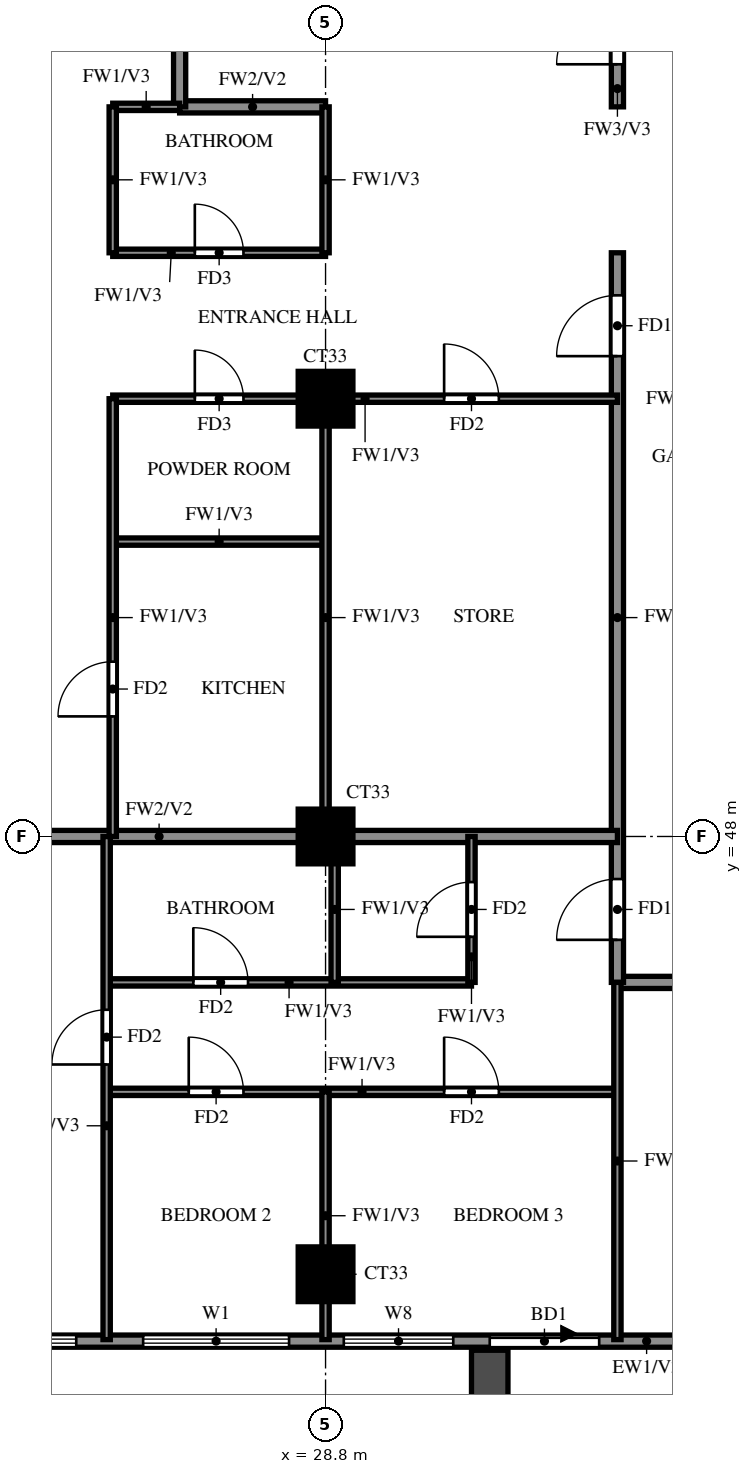
"""IFC4 building model, lengths in metres.
Left out: names, types, materials, properties, quantities, classifications, styles, units other than length and angle.
Written with IfcOpenShell. Run it as: python <this file> out.ifc"""

import sys

from ifc_helpers import new_model, si_unit, direction, frame, frame_2d, origin, origin_2d, place, context, subcontext, project, spatial, rectangle, extrude, source, transform, mapped, element, fill, save


model = new_model("IFC4")
c1 = context("Model", 3, precision=1e-05, world=origin(), true_north=direction((0.0, 1.0)))
c2 = subcontext(c1, "Body", "Model", "MODEL_VIEW")
j1 = project(units=[si_unit("LENGTHUNIT", "METRE"), si_unit("PLANEANGLEUNIT", "RADIAN")], contexts=[c1])
p1 = place(None, origin())
s1 = spatial("IfcSite", under=j1, at=p1, CompositionType="ELEMENT")
p2 = place(p1, origin())
s2 = spatial("IfcBuilding", under=s1, at=p2, CompositionType="ELEMENT")
p3 = place(p2, frame((0.0, 0.0, 225.5)))
s3 = spatial("IfcBuildingStorey", under=s2, at=p3, CompositionType="ELEMENT", Elevation=225.5)
m1 = source(origin(), c2, "Body", "SweptSolid", [
    extrude(rectangle(XDim=0.9, YDim=0.9, at=origin_2d()), origin(), (0.0, 0.0, 1.0), 3.22),
])
for number, where, z_axis, x_axis in (
    (1, (28.8, 40.8, 0.0), (0.0, 0.0, 1.0), (1.0, 0.0, 0.0)),
    (2, (28.8, 48.0, 0.0), (0.0, 0.0, 1.0), (1.0, 0.0, 0.0)),
    (3, (28.8, 55.2, 0.0), (0.0, 0.0, 1.0), (1.0, 0.0, 0.0)),
):
    element("IfcColumn", number, at=place(p3, frame(where, z_axis=z_axis, x_axis=x_axis)), inside=s3, PredefinedType="COLUMN", context=c2, shape_type="MappedRepresentation", body=[
        mapped(m1, transform((0.0, 0.0, 0.0))),
    ])
p4 = place(p3, frame((22.2, 39.7, 0.0), z_axis=(0.0, 0.0, 1.0), x_axis=(1.0, 0.0, 0.0)))
e4 = element("IfcWall", 4, at=p4, inside=s3, PredefinedType="SOLIDWALL", context=c2, shape_type="SweptSolid", body=[
    extrude(rectangle(XDim=19.8, YDim=0.2, at=frame_2d((9.9, 0.0))), origin(), (0.0, 0.0, 1.0), 3.22),
])
p5 = place(p4, frame((9.3, 0.0, 0.0)))
e5 = element("IfcOpeningElement", 5, at=p5, cuts=e4, PredefinedType="OPENING", context=c2, shape_type="SweptSolid", body=[
    extrude(rectangle(XDim=1.8, YDim=2.4, at=frame_2d((0.9, 1.2))), frame((0.0, 0.11, 0.0), z_axis=(0.0, -1.0, 0.0), x_axis=(1.0, 0.0, 0.0)), (0.0, 0.0, 1.0), 0.22),
])
p6 = place(p4, frame((0.7, 0.0, 0.6)))
e6 = element("IfcOpeningElement", 6, at=p6, cuts=e4, PredefinedType="OPENING", context=c2, shape_type="SweptSolid", body=[
    extrude(rectangle(XDim=1.8, YDim=2.4, at=frame_2d((0.9, 1.2))), frame((0.0, 0.11, 0.0), z_axis=(0.0, -1.0, 0.0), x_axis=(1.0, 0.0, 0.0)), (0.0, 0.0, 1.0), 0.22),
])
p7 = place(p4, frame((3.6, 0.0, 0.6)))
e7 = element("IfcOpeningElement", 7, at=p7, cuts=e4, PredefinedType="OPENING", context=c2, shape_type="SweptSolid", body=[
    extrude(rectangle(XDim=2.4, YDim=2.4, at=frame_2d((1.2, 1.2))), frame((0.0, 0.11, 0.0), z_axis=(0.0, -1.0, 0.0), x_axis=(1.0, 0.0, 0.0)), (0.0, 0.0, 1.0), 0.22),
])
p8 = place(p4, frame((6.9, 0.0, 0.6)))
e8 = element("IfcOpeningElement", 8, at=p8, cuts=e4, PredefinedType="OPENING", context=c2, shape_type="SweptSolid", body=[
    extrude(rectangle(XDim=1.8, YDim=2.4, at=frame_2d((0.9, 1.2))), frame((0.0, 0.11, 0.0), z_axis=(0.0, -1.0, 0.0), x_axis=(1.0, 0.0, 0.0)), (0.0, 0.0, 1.0), 0.22),
])
p9 = place(p3, frame((31.5, 39.55, 0.0), z_axis=(0.0, 0.0, 1.0), x_axis=(0.0, -1.0, 0.0)))
e9 = element("IfcWall", 9, at=p9, inside=s3, PredefinedType="SOLIDWALL", context=c2, shape_type="SweptSolid", body=[
    extrude(rectangle(XDim=2.65, YDim=0.6, at=frame_2d((1.325, 0.0))), origin(), (0.0, 0.0, 1.0), 2.85),
])
p10 = place(p3, frame((33.6, 45.6, 0.0), z_axis=(0.0, 0.0, 1.0), x_axis=(1.0, 0.0, 0.0)))
e10 = element("IfcWall", 10, at=p10, inside=s3, PredefinedType="SOLIDWALL", context=c2, shape_type="SweptSolid", body=[
    extrude(rectangle(XDim=7.2, YDim=0.2, at=frame_2d((3.6, 0.0))), origin(), (0.0, 0.0, 1.0), 3.22),
])
p11 = place(p10, frame((3.15, 0.0, 0.0)))
e11 = element("IfcOpeningElement", 11, at=p11, cuts=e10, PredefinedType="OPENING", context=c2, shape_type="SweptSolid", body=[
    extrude(rectangle(XDim=0.9, YDim=2.1, at=frame_2d((0.45, 1.05))), frame((0.0, 0.11, 0.0), z_axis=(0.0, -1.0, 0.0), x_axis=(1.0, 0.0, 0.0)), (0.0, 0.0, 1.0), 0.22),
])
p12 = place(p3, frame((33.6, 45.6, 0.0), z_axis=(0.0, 0.0, 1.0), x_axis=(0.0, 1.0, 0.0)))
e12 = element("IfcWall", 12, at=p12, inside=s3, PredefinedType="SOLIDWALL", context=c2, shape_type="SweptSolid", body=[
    extrude(rectangle(XDim=12.0, YDim=0.2, at=frame_2d((6.0, 0.0))), origin(), (0.0, 0.0, 1.0), 3.22),
])
p13 = place(p12, frame((0.7, 0.0, 0.0)))
e13 = element("IfcOpeningElement", 13, at=p13, cuts=e12, PredefinedType="OPENING", context=c2, shape_type="SweptSolid", body=[
    extrude(rectangle(XDim=1.0, YDim=2.1, at=frame_2d((0.5, 1.05))), frame((0.0, 0.11, 0.0), z_axis=(0.0, -1.0, 0.0), x_axis=(1.0, 0.0, 0.0)), (0.0, 0.0, 1.0), 0.22),
])
p14 = place(p12, frame((10.3, 0.0, 0.0)))
e14 = element("IfcOpeningElement", 14, at=p14, cuts=e12, PredefinedType="OPENING", context=c2, shape_type="SweptSolid", body=[
    extrude(rectangle(XDim=1.0, YDim=2.1, at=frame_2d((0.5, 1.05))), frame((0.0, 0.11, 0.0), z_axis=(0.0, -1.0, 0.0), x_axis=(1.0, 0.0, 0.0)), (0.0, 0.0, 1.0), 0.22),
])
p15 = place(p3, frame((33.6, 60.0, 0.0), z_axis=(0.0, 0.0, 1.0), x_axis=(0.0, 1.0, 0.0)))
e15 = element("IfcWall", 15, at=p15, inside=s3, PredefinedType="SOLIDWALL", context=c2, shape_type="SweptSolid", body=[
    extrude(rectangle(XDim=2.4, YDim=0.2, at=frame_2d((1.2, 0.0))), origin(), (0.0, 0.0, 1.0), 3.22),
])
p16 = place(p15, frame((0.7, 0.0, 0.0)))
e16 = element("IfcOpeningElement", 16, at=p16, cuts=e15, PredefinedType="OPENING", context=c2, shape_type="SweptSolid", body=[
    extrude(rectangle(XDim=1.0, YDim=2.1, at=frame_2d((0.5, 1.05))), frame((0.0, 0.11, 0.0), z_axis=(0.0, -1.0, 0.0), x_axis=(1.0, 0.0, 0.0)), (0.0, 0.0, 1.0), 0.22),
])
p17 = place(p3, frame((18.525, 48.0, 0.0), z_axis=(0.0, 0.0, 1.0), x_axis=(1.0, 0.0, 0.0)))
e17 = element("IfcWall", 17, at=p17, inside=s3, PredefinedType="SOLIDWALL", context=c2, shape_type="SweptSolid", body=[
    extrude(rectangle(XDim=15.075, YDim=0.2, at=frame_2d((7.538, 0.0))), origin(), (0.0, 0.0, 1.0), 3.22),
])
p18 = place(p3, frame((26.4, 60.0, 0.0), z_axis=(0.0, 0.0, 1.0), x_axis=(1.0, 0.0, 0.0)))
e18 = element("IfcWall", 18, at=p18, inside=s3, PredefinedType="SOLIDWALL", context=c2, shape_type="SweptSolid", body=[
    extrude(rectangle(XDim=2.4, YDim=0.2, at=frame_2d((1.2, 0.0))), origin(), (0.0, 0.0, 1.0), 3.22),
])
p19 = place(p3, frame((26.4, 60.0, 0.0), z_axis=(0.0, 0.0, 1.0), x_axis=(0.0, 1.0, 0.0)))
e19 = element("IfcWall", 19, at=p19, inside=s3, PredefinedType="SOLIDWALL", context=c2, shape_type="SweptSolid", body=[
    extrude(rectangle(XDim=2.4, YDim=0.2, at=frame_2d((1.2, 0.0))), origin(), (0.0, 0.0, 1.0), 3.22),
])
p20 = place(p3, frame((25.2, 43.8, 0.0), z_axis=(0.0, 0.0, 1.0), x_axis=(1.0, 0.0, 0.0)))
e20 = element("IfcWall", 20, at=p20, inside=s3, PredefinedType="PARTITIONING", context=c2, shape_type="SweptSolid", body=[
    extrude(rectangle(XDim=8.4, YDim=0.12, at=frame_2d((4.2, 0.0))), origin(), (0.0, 0.0, 1.0), 3.22),
])
p21 = place(p20, frame((1.35, 0.0, 0.0)))
e21 = element("IfcOpeningElement", 21, at=p21, cuts=e20, PredefinedType="OPENING", context=c2, shape_type="SweptSolid", body=[
    extrude(rectangle(XDim=0.9, YDim=2.1, at=frame_2d((0.45, 1.05))), frame((0.0, 0.07, 0.0), z_axis=(0.0, -1.0, 0.0), x_axis=(1.0, 0.0, 0.0)), (0.0, 0.0, 1.0), 0.14),
])
p22 = place(p20, frame((5.55, 0.0, 0.0)))
e22 = element("IfcOpeningElement", 22, at=p22, cuts=e20, PredefinedType="OPENING", context=c2, shape_type="SweptSolid", body=[
    extrude(rectangle(XDim=0.9, YDim=2.1, at=frame_2d((0.45, 1.05))), frame((0.0, 0.07, 0.0), z_axis=(0.0, -1.0, 0.0), x_axis=(1.0, 0.0, 0.0)), (0.0, 0.0, 1.0), 0.14),
])
p23 = place(p3, frame((25.2, 45.6, 0.0), z_axis=(0.0, 0.0, 1.0), x_axis=(1.0, 0.0, 0.0)))
e23 = element("IfcWall", 23, at=p23, inside=s3, PredefinedType="PARTITIONING", context=c2, shape_type="SweptSolid", body=[
    extrude(rectangle(XDim=6.0, YDim=0.12, at=frame_2d((3.0, 0.0))), origin(), (0.0, 0.0, 1.0), 3.22),
])
p24 = place(p23, frame((1.425, 0.0, 0.0)))
e24 = element("IfcOpeningElement", 24, at=p24, cuts=e23, PredefinedType="OPENING", context=c2, shape_type="SweptSolid", body=[
    extrude(rectangle(XDim=0.9, YDim=2.1, at=frame_2d((0.45, 1.05))), frame((0.0, 0.07, 0.0), z_axis=(0.0, -1.0, 0.0), x_axis=(1.0, 0.0, 0.0)), (0.0, 0.0, 1.0), 0.14),
])
p25 = place(p3, frame((25.3, 52.85, 0.0), z_axis=(0.0, 0.0, 1.0), x_axis=(1.0, 0.0, 0.0)))
e25 = element("IfcWall", 25, at=p25, inside=s3, PredefinedType="PARTITIONING", context=c2, shape_type="SweptSolid", body=[
    extrude(rectangle(XDim=3.5, YDim=0.12, at=frame_2d((1.75, 0.0))), origin(), (0.0, 0.0, 1.0), 3.22),
])
p26 = place(p3, frame((25.3, 55.2, 0.0), z_axis=(0.0, 0.0, 1.0), x_axis=(1.0, 0.0, 0.0)))
e26 = element("IfcWall", 26, at=p26, inside=s3, PredefinedType="PARTITIONING", context=c2, shape_type="SweptSolid", body=[
    extrude(rectangle(XDim=8.3, YDim=0.12, at=frame_2d((4.15, 0.0))), origin(), (0.0, 0.0, 1.0), 3.22),
])
p27 = place(p26, frame((1.35, 0.0, 0.0)))
e27 = element("IfcOpeningElement", 27, at=p27, cuts=e26, PredefinedType="OPENING", context=c2, shape_type="SweptSolid", body=[
    extrude(rectangle(XDim=0.8, YDim=2.1, at=frame_2d((0.4, 1.05))), frame((0.0, 0.07, 0.0), z_axis=(0.0, -1.0, 0.0), x_axis=(1.0, 0.0, 0.0)), (0.0, 0.0, 1.0), 0.14),
])
p28 = place(p26, frame((5.45, 0.0, 0.0)))
e28 = element("IfcOpeningElement", 28, at=p28, cuts=e26, PredefinedType="OPENING", context=c2, shape_type="SweptSolid", body=[
    extrude(rectangle(XDim=0.9, YDim=2.1, at=frame_2d((0.45, 1.05))), frame((0.0, 0.07, 0.0), z_axis=(0.0, -1.0, 0.0), x_axis=(1.0, 0.0, 0.0)), (0.0, 0.0, 1.0), 0.14),
])
p29 = place(p3, frame((25.3, 57.6, 0.0), z_axis=(0.0, 0.0, 1.0), x_axis=(1.0, 0.0, 0.0)))
e29 = element("IfcWall", 29, at=p29, inside=s3, PredefinedType="PARTITIONING", context=c2, shape_type="SweptSolid", body=[
    extrude(rectangle(XDim=3.5, YDim=0.12, at=frame_2d((1.75, 0.0))), origin(), (0.0, 0.0, 1.0), 3.22),
])
p30 = place(p29, frame((1.35, 0.0, 0.0)))
e30 = element("IfcOpeningElement", 30, at=p30, cuts=e29, PredefinedType="OPENING", context=c2, shape_type="SweptSolid", body=[
    extrude(rectangle(XDim=0.8, YDim=2.1, at=frame_2d((0.4, 1.05))), frame((0.0, 0.07, 0.0), z_axis=(0.0, -1.0, 0.0), x_axis=(1.0, 0.0, 0.0)), (0.0, 0.0, 1.0), 0.14),
])
p31 = place(p3, frame((25.3, 60.0, 0.0), z_axis=(0.0, 0.0, 1.0), x_axis=(1.0, 0.0, 0.0)))
e31 = element("IfcWall", 31, at=p31, inside=s3, PredefinedType="PARTITIONING", context=c2, shape_type="SweptSolid", body=[
    extrude(rectangle(XDim=1.1, YDim=0.12, at=frame_2d((0.55, 0.0))), origin(), (0.0, 0.0, 1.0), 3.22),
])
p32 = place(p3, frame((25.2, 39.725, 0.0), z_axis=(0.0, 0.0, 1.0), x_axis=(0.0, 1.0, 0.0)))
e32 = element("IfcWall", 32, at=p32, inside=s3, PredefinedType="PARTITIONING", context=c2, shape_type="SweptSolid", body=[
    extrude(rectangle(XDim=8.275, YDim=0.12, at=frame_2d((4.137, 0.0))), origin(), (0.0, 0.0, 1.0), 3.22),
])
p33 = place(p32, frame((4.525, 0.0, 0.0)))
e33 = element("IfcOpeningElement", 33, at=p33, cuts=e32, PredefinedType="OPENING", context=c2, shape_type="SweptSolid", body=[
    extrude(rectangle(XDim=0.9, YDim=2.1, at=frame_2d((0.45, 1.05))), frame((0.0, 0.07, 0.0), z_axis=(0.0, -1.0, 0.0), x_axis=(1.0, 0.0, 0.0)), (0.0, 0.0, 1.0), 0.14),
])
p34 = place(p3, frame((25.3, 48.0, 0.0), z_axis=(0.0, 0.0, 1.0), x_axis=(0.0, 1.0, 0.0)))
e34 = element("IfcWall", 34, at=p34, inside=s3, PredefinedType="PARTITIONING", context=c2, shape_type="SweptSolid", body=[
    extrude(rectangle(XDim=7.2, YDim=0.12, at=frame_2d((3.6, 0.0))), origin(), (0.0, 0.0, 1.0), 3.22),
])
p35 = place(p34, frame((1.975, 0.0, 0.0)))
e35 = element("IfcOpeningElement", 35, at=p35, cuts=e34, PredefinedType="OPENING", context=c2, shape_type="SweptSolid", body=[
    extrude(rectangle(XDim=0.9, YDim=2.1, at=frame_2d((0.45, 1.05))), frame((0.0, 0.07, 0.0), z_axis=(0.0, -1.0, 0.0), x_axis=(1.0, 0.0, 0.0)), (0.0, 0.0, 1.0), 0.14),
])
p36 = place(p3, frame((25.3, 57.6, 0.0), z_axis=(0.0, 0.0, 1.0), x_axis=(0.0, 1.0, 0.0)))
e36 = element("IfcWall", 36, at=p36, inside=s3, PredefinedType="PARTITIONING", context=c2, shape_type="SweptSolid", body=[
    extrude(rectangle(XDim=2.4, YDim=0.12, at=frame_2d((1.2, 0.0))), origin(), (0.0, 0.0, 1.0), 3.22),
])
p37 = place(p3, frame((28.8, 39.725, 0.0), z_axis=(0.0, 0.0, 1.0), x_axis=(0.0, 1.0, 0.0)))
e37 = element("IfcWall", 37, at=p37, inside=s3, PredefinedType="PARTITIONING", context=c2, shape_type="SweptSolid", body=[
    extrude(rectangle(XDim=4.075, YDim=0.12, at=frame_2d((2.038, 0.0))), origin(), (0.0, 0.0, 1.0), 3.22),
])
p38 = place(p3, frame((28.8, 48.0, 0.0), z_axis=(0.0, 0.0, 1.0), x_axis=(0.0, 1.0, 0.0)))
e38 = element("IfcWall", 38, at=p38, inside=s3, PredefinedType="PARTITIONING", context=c2, shape_type="SweptSolid", body=[
    extrude(rectangle(XDim=7.2, YDim=0.12, at=frame_2d((3.6, 0.0))), origin(), (0.0, 0.0, 1.0), 3.22),
])
for number, where, z_axis, x_axis in (
    (39, (28.8, 57.6, 0.0), (0.0, 0.0, 1.0), (0.0, 1.0, 0.0)),
    (40, (28.95, 45.6, 0.0), (0.0, 0.0, 1.0), (0.0, 1.0, 0.0)),
):
    element("IfcWall", number, at=place(p3, frame(where, z_axis=z_axis, x_axis=x_axis)), inside=s3, PredefinedType="PARTITIONING", context=c2, shape_type="SweptSolid", body=[
        extrude(rectangle(XDim=2.4, YDim=0.12, at=frame_2d((1.2, 0.0))), origin(), (0.0, 0.0, 1.0), 3.22),
    ])
p39 = place(p3, frame((31.2, 45.6, 0.0), z_axis=(0.0, 0.0, 1.0), x_axis=(0.0, 1.0, 0.0)))
e41 = element("IfcWall", 41, at=p39, inside=s3, PredefinedType="PARTITIONING", context=c2, shape_type="SweptSolid", body=[
    extrude(rectangle(XDim=2.4, YDim=0.12, at=frame_2d((1.2, 0.0))), origin(), (0.0, 0.0, 1.0), 3.22),
])
p40 = place(p39, frame((0.75, 0.0, 0.0)))
e42 = element("IfcOpeningElement", 42, at=p40, cuts=e41, PredefinedType="OPENING", context=c2, shape_type="SweptSolid", body=[
    extrude(rectangle(XDim=0.9, YDim=2.1, at=frame_2d((0.45, 1.05))), frame((0.0, 0.07, 0.0), z_axis=(0.0, -1.0, 0.0), x_axis=(1.0, 0.0, 0.0)), (0.0, 0.0, 1.0), 0.14),
])
p41 = place(p3, frame((33.6, 39.725, 0.0), z_axis=(0.0, 0.0, 1.0), x_axis=(0.0, 1.0, 0.0)))
e43 = element("IfcWall", 43, at=p41, inside=s3, PredefinedType="PARTITIONING", context=c2, shape_type="SweptSolid", body=[
    extrude(rectangle(XDim=5.875, YDim=0.12, at=frame_2d((2.938, 0.0))), origin(), (0.0, 0.0, 1.0), 3.22),
])
p42 = place(p5, origin())
e44 = element("IfcDoor", 44, at=p42, inside=s3, OperationType="DOUBLE_DOOR_SLIDING", PredefinedType="DOOR", context=c2, shape_type="SweptSolid", body=[
    extrude(rectangle(XDim=1.8, YDim=2.4, at=frame_2d((0.9, 1.2))), frame((0.0, 0.025, 0.0), z_axis=(0.0, -1.0, 0.0), x_axis=(1.0, 0.0, 0.0)), (0.0, 0.0, 1.0), 0.05),
])
fill(e5, e44)
p43 = place(p6, origin())
e45 = element("IfcWindow", 45, at=p43, inside=s3, PartitioningType="DOUBLE_PANEL_VERTICAL", PredefinedType="WINDOW", context=c2, shape_type="SweptSolid", body=[
    extrude(rectangle(XDim=1.8, YDim=2.4, at=frame_2d((0.9, 1.2))), frame((0.0, 0.03, 0.0), z_axis=(0.0, -1.0, 0.0), x_axis=(1.0, 0.0, 0.0)), (0.0, 0.0, 1.0), 0.06),
])
fill(e6, e45)
p44 = place(p7, origin())
e46 = element("IfcWindow", 46, at=p44, inside=s3, PartitioningType="DOUBLE_PANEL_VERTICAL", PredefinedType="WINDOW", context=c2, shape_type="SweptSolid", body=[
    extrude(rectangle(XDim=2.4, YDim=2.4, at=frame_2d((1.2, 1.2))), frame((0.0, 0.03, 0.0), z_axis=(0.0, -1.0, 0.0), x_axis=(1.0, 0.0, 0.0)), (0.0, 0.0, 1.0), 0.06),
])
fill(e7, e46)
p45 = place(p8, origin())
e47 = element("IfcWindow", 47, at=p45, inside=s3, PartitioningType="DOUBLE_PANEL_VERTICAL", PredefinedType="WINDOW", context=c2, shape_type="SweptSolid", body=[
    extrude(rectangle(XDim=1.8, YDim=2.4, at=frame_2d((0.9, 1.2))), frame((0.0, 0.03, 0.0), z_axis=(0.0, -1.0, 0.0), x_axis=(1.0, 0.0, 0.0)), (0.0, 0.0, 1.0), 0.06),
])
fill(e8, e47)
p46 = place(p13, origin())
e48 = element("IfcDoor", 48, at=p46, inside=s3, OperationType="SINGLE_SWING_RIGHT", PredefinedType="DOOR", context=c2, shape_type="SweptSolid", body=[
    extrude(rectangle(XDim=1.0, YDim=2.1, at=frame_2d((0.5, 1.05))), frame((0.0, 0.025, 0.0), z_axis=(0.0, -1.0, 0.0), x_axis=(1.0, 0.0, 0.0)), (0.0, 0.0, 1.0), 0.05),
])
fill(e13, e48)
p47 = place(p33, origin())
e49 = element("IfcDoor", 49, at=p47, inside=s3, OperationType="SINGLE_SWING_LEFT", PredefinedType="DOOR", context=c2, shape_type="SweptSolid", body=[
    extrude(rectangle(XDim=0.9, YDim=2.1, at=frame_2d((0.45, 1.05))), frame((0.0, 0.025, 0.0), z_axis=(0.0, -1.0, 0.0), x_axis=(1.0, 0.0, 0.0)), (0.0, 0.0, 1.0), 0.05),
])
fill(e33, e49)
p48 = place(p21, origin())
e50 = element("IfcDoor", 50, at=p48, inside=s3, OperationType="SINGLE_SWING_LEFT", PredefinedType="DOOR", context=c2, shape_type="SweptSolid", body=[
    extrude(rectangle(XDim=0.9, YDim=2.1, at=frame_2d((0.45, 1.05))), frame((0.0, 0.025, 0.0), z_axis=(0.0, -1.0, 0.0), x_axis=(1.0, 0.0, 0.0)), (0.0, 0.0, 1.0), 0.05),
])
fill(e21, e50)
p49 = place(p22, origin())
e51 = element("IfcDoor", 51, at=p49, inside=s3, OperationType="SINGLE_SWING_RIGHT", PredefinedType="DOOR", context=c2, shape_type="SweptSolid", body=[
    extrude(rectangle(XDim=0.9, YDim=2.1, at=frame_2d((0.45, 1.05))), frame((0.0, 0.025, 0.0), z_axis=(0.0, -1.0, 0.0), x_axis=(1.0, 0.0, 0.0)), (0.0, 0.0, 1.0), 0.05),
])
fill(e22, e51)
p50 = place(p24, origin())
e52 = element("IfcDoor", 52, at=p50, inside=s3, OperationType="SINGLE_SWING_LEFT", PredefinedType="DOOR", context=c2, shape_type="SweptSolid", body=[
    extrude(rectangle(XDim=0.9, YDim=2.1, at=frame_2d((0.45, 1.05))), frame((0.0, 0.025, 0.0), z_axis=(0.0, -1.0, 0.0), x_axis=(1.0, 0.0, 0.0)), (0.0, 0.0, 1.0), 0.05),
])
fill(e24, e52)
p51 = place(p40, origin())
e53 = element("IfcDoor", 53, at=p51, inside=s3, OperationType="SINGLE_SWING_LEFT", PredefinedType="DOOR", context=c2, shape_type="SweptSolid", body=[
    extrude(rectangle(XDim=0.9, YDim=2.1, at=frame_2d((0.45, 1.05))), frame((0.0, 0.025, 0.0), z_axis=(0.0, -1.0, 0.0), x_axis=(1.0, 0.0, 0.0)), (0.0, 0.0, 1.0), 0.05),
])
fill(e42, e53)
p52 = place(p14, origin())
e54 = element("IfcDoor", 54, at=p52, inside=s3, OperationType="SINGLE_SWING_LEFT", PredefinedType="DOOR", context=c2, shape_type="SweptSolid", body=[
    extrude(rectangle(XDim=1.0, YDim=2.1, at=frame_2d((0.5, 1.05))), frame((0.0, 0.025, 0.0), z_axis=(0.0, -1.0, 0.0), x_axis=(1.0, 0.0, 0.0)), (0.0, 0.0, 1.0), 0.05),
])
fill(e14, e54)
p53 = place(p35, origin())
e55 = element("IfcDoor", 55, at=p53, inside=s3, OperationType="SINGLE_SWING_LEFT", PredefinedType="DOOR", context=c2, shape_type="SweptSolid", body=[
    extrude(rectangle(XDim=0.9, YDim=2.1, at=frame_2d((0.45, 1.05))), frame((0.0, 0.025, 0.0), z_axis=(0.0, -1.0, 0.0), x_axis=(1.0, 0.0, 0.0)), (0.0, 0.0, 1.0), 0.05),
])
fill(e35, e55)
p54 = place(p27, origin())
e56 = element("IfcDoor", 56, at=p54, inside=s3, OperationType="SINGLE_SWING_RIGHT", PredefinedType="DOOR", context=c2, shape_type="SweptSolid", body=[
    extrude(rectangle(XDim=0.8, YDim=2.1, at=frame_2d((0.4, 1.05))), frame((0.0, 0.025, 0.0), z_axis=(0.0, -1.0, 0.0), x_axis=(1.0, 0.0, 0.0)), (0.0, 0.0, 1.0), 0.05),
])
fill(e27, e56)
p55 = place(p30, origin())
e57 = element("IfcDoor", 57, at=p55, inside=s3, OperationType="SINGLE_SWING_LEFT", PredefinedType="DOOR", context=c2, shape_type="SweptSolid", body=[
    extrude(rectangle(XDim=0.8, YDim=2.1, at=frame_2d((0.4, 1.05))), frame((0.0, 0.025, 0.0), z_axis=(0.0, -1.0, 0.0), x_axis=(1.0, 0.0, 0.0)), (0.0, 0.0, 1.0), 0.05),
])
fill(e30, e57)
p56 = place(p28, origin())
e58 = element("IfcDoor", 58, at=p56, inside=s3, OperationType="SINGLE_SWING_LEFT", PredefinedType="DOOR", context=c2, shape_type="SweptSolid", body=[
    extrude(rectangle(XDim=0.9, YDim=2.1, at=frame_2d((0.45, 1.05))), frame((0.0, 0.025, 0.0), z_axis=(0.0, -1.0, 0.0), x_axis=(1.0, 0.0, 0.0)), (0.0, 0.0, 1.0), 0.05),
])
fill(e28, e58)
p57 = place(p16, origin())
e59 = element("IfcDoor", 59, at=p57, inside=s3, OperationType="SINGLE_SWING_RIGHT", PredefinedType="DOOR", context=c2, shape_type="SweptSolid", body=[
    extrude(rectangle(XDim=1.0, YDim=2.1, at=frame_2d((0.5, 1.05))), frame((0.0, 0.025, 0.0), z_axis=(0.0, -1.0, 0.0), x_axis=(1.0, 0.0, 0.0)), (0.0, 0.0, 1.0), 0.05),
])
fill(e16, e59)
save(model, sys.argv[1])
